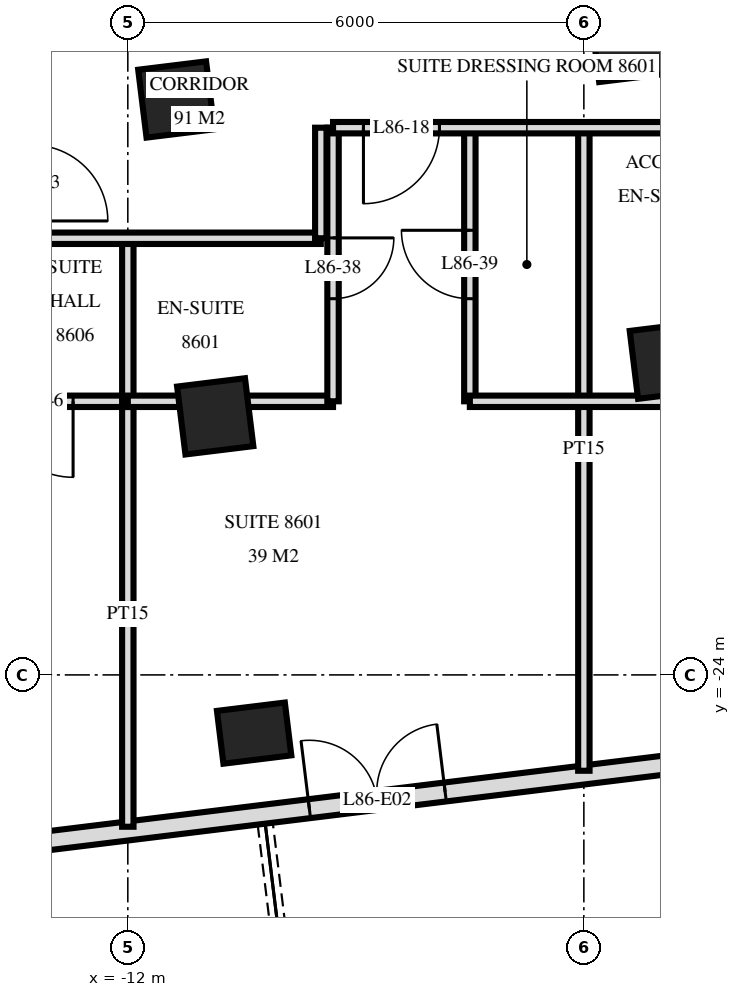
"""IFC4 building model, lengths in metres.
Left out: names, types, materials, properties, quantities, classifications, styles, units other than length and angle.
Written with IfcOpenShell. Run it as: python <this file> out.ifc"""

import sys

from ifc_helpers import new_model, si_unit, direction, frame, frame_2d, origin, origin_2d, place, context, subcontext, project, spatial, rectangle, extrude, element, fill, save


model = new_model("IFC4")
c1 = context("Model", 3, precision=1e-05, world=origin(), true_north=direction((0.0, 1.0)))
c2 = subcontext(c1, "Body", "Model", "MODEL_VIEW")
j1 = project(units=[si_unit("LENGTHUNIT", "METRE"), si_unit("PLANEANGLEUNIT", "RADIAN")], contexts=[c1])
p1 = place(None, origin())
s1 = spatial("IfcSite", under=j1, at=p1, CompositionType="ELEMENT")
p2 = place(p1, origin())
s2 = spatial("IfcBuilding", under=s1, at=p2, CompositionType="ELEMENT")
p3 = place(p2, frame((0.0, 0.0, 326.6)))
s3 = spatial("IfcBuildingStorey", under=s2, at=p3, CompositionType="ELEMENT", Elevation=326.6)
for number, where, z_axis, x_axis in (
    (1, (-11.362, -16.429, 0.0), (0.0, 0.0, 1.0), (0.993, 0.122, 0.0)),
    (2, (-10.85, -20.598, 0.0), (0.0, 0.0, 1.0), (0.993, 0.122, 0.0)),
):
    element("IfcColumn", number, at=place(p3, frame(where, z_axis=z_axis, x_axis=x_axis)), inside=s3, PredefinedType="COLUMN", context=c2, shape_type="SweptSolid", body=[
        extrude(rectangle(XDim=0.9, YDim=0.9, at=origin_2d()), origin(), (0.0, 0.0, 1.0), 4.0),
    ])
p4 = place(p3, frame((-10.338, -24.766, 0.0), z_axis=(0.0, 0.0, 1.0), x_axis=(0.992546151641, 0.121869343405, 0.0)))
e3 = element("IfcColumn", 3, at=p4, inside=s3, PredefinedType="COLUMN", context=c2, shape_type="SweptSolid", body=[
    extrude(rectangle(XDim=0.9, YDim=0.7, at=origin_2d()), origin(), (0.0, 0.0, 1.0), 4.0),
])
for number, where, z_axis, x_axis in (
    (4, (-5.407, -15.698, 0.0), (0.0, 0.0, 1.0), (0.993, 0.122, 0.0)),
    (5, (-4.895, -19.866, 0.0), (0.0, 0.0, 1.0), (0.993, 0.122, 0.0)),
):
    element("IfcColumn", number, at=place(p3, frame(where, z_axis=z_axis, x_axis=x_axis)), inside=s3, PredefinedType="COLUMN", context=c2, shape_type="SweptSolid", body=[
        extrude(rectangle(XDim=0.9, YDim=0.9, at=origin_2d()), origin(), (0.0, 0.0, 1.0), 4.0),
    ])
p5 = place(p3, frame((-16.138, -26.561, 0.0), z_axis=(0.0, 0.0, 1.0), x_axis=(0.992546726876, 0.121864658405, 0.0)))
e6 = element("IfcWall", 6, at=p5, inside=s3, PredefinedType="SOLIDWALL", context=c2, shape_type="SweptSolid", body=[
    extrude(rectangle(XDim=35.951, YDim=0.25, at=frame_2d((17.975, 0.0))), origin(), (0.0, 0.0, 1.0), 3.72),
])
p6 = place(p5, frame((0.575, 0.0, 0.0)))
e7 = element("IfcOpeningElement", 7, at=p6, cuts=e6, PredefinedType="OPENING", context=c2, shape_type="SweptSolid", body=[
    extrude(rectangle(XDim=1.8, YDim=2.4, at=frame_2d((0.9, 1.2))), frame((0.0, 0.135, 0.0), z_axis=(0.0, -1.0, 0.0), x_axis=(1.0, 0.0, 0.0)), (0.0, 0.0, 1.0), 0.27),
])
p7 = place(p5, frame((6.576, 0.0, 0.0)))
e8 = element("IfcOpeningElement", 8, at=p7, cuts=e6, PredefinedType="OPENING", context=c2, shape_type="SweptSolid", body=[
    extrude(rectangle(XDim=1.8, YDim=2.4, at=frame_2d((0.9, 1.2))), frame((0.0, 0.135, 0.0), z_axis=(0.0, -1.0, 0.0), x_axis=(1.0, 0.0, 0.0)), (0.0, 0.0, 1.0), 0.27),
])
p8 = place(p5, frame((12.575, 0.0, 0.0)))
e9 = element("IfcOpeningElement", 9, at=p8, cuts=e6, PredefinedType="OPENING", context=c2, shape_type="SweptSolid", body=[
    extrude(rectangle(XDim=1.8, YDim=2.4, at=frame_2d((0.9, 1.2))), frame((0.0, 0.135, 0.0), z_axis=(0.0, -1.0, 0.0), x_axis=(1.0, 0.0, 0.0)), (0.0, 0.0, 1.0), 0.27),
])
p9 = place(p5, frame((18.575, 0.0, 0.0)))
e10 = element("IfcOpeningElement", 10, at=p9, cuts=e6, PredefinedType="OPENING", context=c2, shape_type="SweptSolid", body=[
    extrude(rectangle(XDim=1.8, YDim=2.4, at=frame_2d((0.9, 1.2))), frame((0.0, 0.135, 0.0), z_axis=(0.0, -1.0, 0.0), x_axis=(1.0, 0.0, 0.0)), (0.0, 0.0, 1.0), 0.27),
])
p10 = place(p5, frame((22.528, 0.0, 0.0)))
e11 = element("IfcOpeningElement", 11, at=p10, cuts=e6, PredefinedType="OPENING", context=c2, shape_type="SweptSolid", body=[
    extrude(rectangle(XDim=1.2, YDim=2.4, at=frame_2d((0.6, 1.2))), frame((0.0, 0.135, 0.0), z_axis=(0.0, -1.0, 0.0), x_axis=(1.0, 0.0, 0.0)), (0.0, 0.0, 1.0), 0.27),
])
p11 = place(p5, frame((25.923, 0.0, 0.0)))
e12 = element("IfcOpeningElement", 12, at=p11, cuts=e6, PredefinedType="OPENING", context=c2, shape_type="SweptSolid", body=[
    extrude(rectangle(XDim=1.8, YDim=2.4, at=frame_2d((0.9, 1.2))), frame((0.0, 0.135, 0.0), z_axis=(0.0, -1.0, 0.0), x_axis=(1.0, 0.0, 0.0)), (0.0, 0.0, 1.0), 0.27),
])
p12 = place(p5, frame((30.576, 0.0, 0.0)))
e13 = element("IfcOpeningElement", 13, at=p12, cuts=e6, PredefinedType="OPENING", context=c2, shape_type="SweptSolid", body=[
    extrude(rectangle(XDim=1.8, YDim=2.4, at=frame_2d((0.9, 1.2))), frame((0.0, 0.135, 0.0), z_axis=(0.0, -1.0, 0.0), x_axis=(1.0, 0.0, 0.0)), (0.0, 0.0, 1.0), 0.27),
])
p13 = place(p3, frame((-6.0, -25.261, 0.0), z_axis=(0.0, 0.0, 1.0), x_axis=(0.0, 1.0, 0.0)))
e14 = element("IfcWall", 14, at=p13, inside=s3, PredefinedType="PARTITIONING", context=c2, shape_type="SweptSolid", body=[
    extrude(rectangle(XDim=8.461, YDim=0.15, at=frame_2d((4.23, 0.0))), origin(), (0.0, 0.0, 1.0), 3.72),
])
p14 = place(p3, frame((-7.5, -20.4, 0.0), z_axis=(0.0, 0.0, 1.0), x_axis=(0.0, 1.0, 0.0)))
e15 = element("IfcWall", 15, at=p14, inside=s3, PredefinedType="PARTITIONING", context=c2, shape_type="SweptSolid", body=[
    extrude(rectangle(XDim=3.6, YDim=0.15, at=frame_2d((1.8, 0.0))), origin(), (0.0, 0.0, 1.0), 3.72),
])
p15 = place(p14, frame((1.35, 0.0, 0.0)))
e16 = element("IfcOpeningElement", 16, at=p15, cuts=e15, PredefinedType="OPENING", context=c2, shape_type="SweptSolid", body=[
    extrude(rectangle(XDim=0.9, YDim=2.1, at=frame_2d((0.45, 1.05))), frame((0.0, 0.085, 0.0), z_axis=(0.0, -1.0, 0.0), x_axis=(1.0, 0.0, 0.0)), (0.0, 0.0, 1.0), 0.17),
])
p16 = place(p3, frame((-9.3, -20.4, 0.0), z_axis=(0.0, 0.0, 1.0), x_axis=(0.0, 1.0, 0.0)))
e17 = element("IfcWall", 17, at=p16, inside=s3, PredefinedType="PARTITIONING", context=c2, shape_type="SweptSolid", body=[
    extrude(rectangle(XDim=3.6, YDim=0.15, at=frame_2d((1.8, 0.0))), origin(), (0.0, 0.0, 1.0), 3.72),
])
p17 = place(p16, frame((1.35, 0.0, 0.0)))
e18 = element("IfcOpeningElement", 18, at=p17, cuts=e17, PredefinedType="OPENING", context=c2, shape_type="SweptSolid", body=[
    extrude(rectangle(XDim=0.8, YDim=2.1, at=frame_2d((0.4, 1.05))), frame((0.0, 0.085, 0.0), z_axis=(0.0, -1.0, 0.0), x_axis=(1.0, 0.0, 0.0)), (0.0, 0.0, 1.0), 0.17),
])
p18 = place(p3, frame((-9.461, -18.255, 0.0), z_axis=(0.0, 0.0, 1.0), x_axis=(0.0, 1.0, 0.0)))
e19 = element("IfcWall", 19, at=p18, inside=s3, PredefinedType="PARTITIONING", context=c2, shape_type="SweptSolid", body=[
    extrude(rectangle(XDim=1.455, YDim=0.15, at=frame_2d((0.728, 0.0))), origin(), (0.0, 0.0, 1.0), 3.72),
])
p19 = place(p3, frame((-12.0, -20.4, 0.0), z_axis=(0.0, 0.0, 1.0), x_axis=(0.0, 1.0, 0.0)))
e20 = element("IfcWall", 20, at=p19, inside=s3, PredefinedType="PARTITIONING", context=c2, shape_type="SweptSolid", body=[
    extrude(rectangle(XDim=2.145, YDim=0.15, at=frame_2d((1.073, 0.0))), origin(), (0.0, 0.0, 1.0), 3.72),
])
p20 = place(p3, frame((-12.0, -25.998, 0.0), z_axis=(0.0, 0.0, 1.0), x_axis=(0.0, 1.0, 0.0)))
e21 = element("IfcWall", 21, at=p20, inside=s3, PredefinedType="PARTITIONING", context=c2, shape_type="SweptSolid", body=[
    extrude(rectangle(XDim=5.598, YDim=0.15, at=frame_2d((2.799, 0.0))), origin(), (0.0, 0.0, 1.0), 3.72),
])
p21 = place(p3, frame((-14.4, -20.4, 0.0), z_axis=(0.0, 0.0, 1.0), x_axis=(1.0, 0.0, 0.0)))
e22 = element("IfcWall", 22, at=p21, inside=s3, PredefinedType="PARTITIONING", context=c2, shape_type="SweptSolid", body=[
    extrude(rectangle(XDim=2.4, YDim=0.15, at=frame_2d((1.2, 0.0))), origin(), (0.0, 0.0, 1.0), 3.72),
])
p22 = place(p21, frame((0.68, 0.0, 0.0)))
e23 = element("IfcOpeningElement", 23, at=p22, cuts=e22, PredefinedType="OPENING", context=c2, shape_type="SweptSolid", body=[
    extrude(rectangle(XDim=1.0, YDim=2.1, at=frame_2d((0.5, 1.05))), frame((0.0, 0.085, 0.0), z_axis=(0.0, -1.0, 0.0), x_axis=(1.0, 0.0, 0.0)), (0.0, 0.0, 1.0), 0.17),
])
p23 = place(p3, frame((-12.0, -20.4, 0.0), z_axis=(0.0, 0.0, 1.0), x_axis=(1.0, 0.0, 0.0)))
e24 = element("IfcWall", 24, at=p23, inside=s3, PredefinedType="PARTITIONING", context=c2, shape_type="SweptSolid", body=[
    extrude(rectangle(XDim=2.7, YDim=0.15, at=frame_2d((1.35, 0.0))), origin(), (0.0, 0.0, 1.0), 3.72),
])
p24 = place(p3, frame((-7.5, -20.4, 0.0), z_axis=(0.0, 0.0, 1.0), x_axis=(1.0, 0.0, 0.0)))
e25 = element("IfcWall", 25, at=p24, inside=s3, PredefinedType="PARTITIONING", context=c2, shape_type="SweptSolid", body=[
    extrude(rectangle(XDim=4.2, YDim=0.15, at=frame_2d((2.1, 0.0))), origin(), (0.0, 0.0, 1.0), 3.72),
])
p25 = place(p3, frame((-13.263, -18.255, 0.0), z_axis=(0.0, 0.0, 1.0), x_axis=(1.0, 0.0, 0.0)))
e26 = element("IfcWall", 26, at=p25, inside=s3, PredefinedType="PARTITIONING", context=c2, shape_type="SweptSolid", body=[
    extrude(rectangle(XDim=3.802, YDim=0.15, at=frame_2d((1.901, 0.0))), origin(), (0.0, 0.0, 1.0), 3.72),
])
p26 = place(p3, frame((-9.3, -16.8, 0.0), z_axis=(0.0, 0.0, 1.0), x_axis=(1.0, 0.0, 0.0)))
e27 = element("IfcWall", 27, at=p26, inside=s3, PredefinedType="PARTITIONING", context=c2, shape_type="SweptSolid", body=[
    extrude(rectangle(XDim=32.561, YDim=0.15, at=frame_2d((16.281, 0.0))), origin(), (0.0, 0.0, 1.0), 3.72),
])
p27 = place(p26, frame((0.4, 0.0, 0.0)))
e28 = element("IfcOpeningElement", 28, at=p27, cuts=e27, PredefinedType="OPENING", context=c2, shape_type="SweptSolid", body=[
    extrude(rectangle(XDim=1.0, YDim=2.1, at=frame_2d((0.5, 1.05))), frame((0.0, 0.085, 0.0), z_axis=(0.0, -1.0, 0.0), x_axis=(1.0, 0.0, 0.0)), (0.0, 0.0, 1.0), 0.17),
])
p28 = place(p26, frame((7.15, 0.0, 0.0)))
e29 = element("IfcOpeningElement", 29, at=p28, cuts=e27, PredefinedType="OPENING", context=c2, shape_type="SweptSolid", body=[
    extrude(rectangle(XDim=1.0, YDim=2.1, at=frame_2d((0.5, 1.05))), frame((0.0, 0.085, 0.0), z_axis=(0.0, -1.0, 0.0), x_axis=(1.0, 0.0, 0.0)), (0.0, 0.0, 1.0), 0.17),
])
p29 = place(p26, frame((9.7, 0.0, 0.0)))
e30 = element("IfcOpeningElement", 30, at=p29, cuts=e27, PredefinedType="OPENING", context=c2, shape_type="SweptSolid", body=[
    extrude(rectangle(XDim=1.0, YDim=2.1, at=frame_2d((0.5, 1.05))), frame((0.0, 0.085, 0.0), z_axis=(0.0, -1.0, 0.0), x_axis=(1.0, 0.0, 0.0)), (0.0, 0.0, 1.0), 0.17),
])
p30 = place(p26, frame((17.149, 0.0, 0.0)))
e31 = element("IfcOpeningElement", 31, at=p30, cuts=e27, PredefinedType="OPENING", context=c2, shape_type="SweptSolid", body=[
    extrude(rectangle(XDim=1.0, YDim=2.1, at=frame_2d((0.5, 1.05))), frame((0.0, 0.085, 0.0), z_axis=(0.0, -1.0, 0.0), x_axis=(1.0, 0.0, 0.0)), (0.0, 0.0, 1.0), 0.17),
])
p31 = place(p26, frame((18.45, 0.0, 0.0)))
e32 = element("IfcOpeningElement", 32, at=p31, cuts=e27, PredefinedType="OPENING", context=c2, shape_type="SweptSolid", body=[
    extrude(rectangle(XDim=1.0, YDim=2.1, at=frame_2d((0.5, 1.05))), frame((0.0, 0.085, 0.0), z_axis=(0.0, -1.0, 0.0), x_axis=(1.0, 0.0, 0.0)), (0.0, 0.0, 1.0), 0.17),
])
p32 = place(p26, frame((24.98, 0.0, 0.0)))
e33 = element("IfcOpeningElement", 33, at=p32, cuts=e27, PredefinedType="OPENING", context=c2, shape_type="SweptSolid", body=[
    extrude(rectangle(XDim=1.0, YDim=2.1, at=frame_2d((0.5, 1.05))), frame((0.0, 0.085, 0.0), z_axis=(0.0, -1.0, 0.0), x_axis=(1.0, 0.0, 0.0)), (0.0, 0.0, 1.0), 0.17),
])
p33 = place(p7, origin())
e34 = element("IfcDoor", 34, at=p33, inside=s3, OperationType="DOUBLE_DOOR_SINGLE_SWING", PredefinedType="DOOR", context=c2, shape_type="SweptSolid", body=[
    extrude(rectangle(XDim=1.8, YDim=2.4, at=frame_2d((0.9, 1.2))), frame((0.0, 0.025, 0.0), z_axis=(0.0, -1.0, 0.0), x_axis=(1.0, 0.0, 0.0)), (0.0, 0.0, 1.0), 0.05),
])
fill(e8, e34)
p34 = place(p27, frame((0.5, 0.0, 0.0), z_axis=(0.0, 0.0, 1.0), x_axis=(-1.0, 0.0, 0.0)))
e35 = element("IfcDoor", 35, at=p34, inside=s3, OperationType="SINGLE_SWING_LEFT", PredefinedType="DOOR", context=c2, shape_type="SweptSolid", body=[
    extrude(rectangle(XDim=1.0, YDim=2.1, at=frame_2d((0.0, 1.05))), frame((0.0, -0.025, 0.0), z_axis=(0.0, 1.0, 0.0), x_axis=(-1.0, 0.0, 0.0)), (0.0, 0.0, 1.0), 0.05),
])
fill(e28, e35)
p35 = place(p17, frame((0.4, 0.0, 0.0), z_axis=(0.0, 0.0, 1.0), x_axis=(-1.0, 0.0, 0.0)))
e36 = element("IfcDoor", 36, at=p35, inside=s3, OperationType="SINGLE_SWING_RIGHT", PredefinedType="DOOR", context=c2, shape_type="SweptSolid", body=[
    extrude(rectangle(XDim=0.8, YDim=2.1, at=frame_2d((0.0, 1.05))), frame((0.0, -0.025, 0.0), z_axis=(0.0, 1.0, 0.0), x_axis=(-1.0, 0.0, 0.0)), (0.0, 0.0, 1.0), 0.05),
])
fill(e18, e36)
p36 = place(p15, origin())
e37 = element("IfcDoor", 37, at=p36, inside=s3, OperationType="SINGLE_SWING_LEFT", PredefinedType="DOOR", context=c2, shape_type="SweptSolid", body=[
    extrude(rectangle(XDim=0.9, YDim=2.1, at=frame_2d((0.45, 1.05))), frame((0.0, 0.025, 0.0), z_axis=(0.0, -1.0, 0.0), x_axis=(1.0, 0.0, 0.0)), (0.0, 0.0, 1.0), 0.05),
])
fill(e16, e37)
p37 = place(p22, frame((0.5, 0.0, 0.0), z_axis=(0.0, 0.0, 1.0), x_axis=(-1.0, 0.0, 0.0)))
e38 = element("IfcDoor", 38, at=p37, inside=s3, OperationType="SINGLE_SWING_RIGHT", PredefinedType="DOOR", context=c2, shape_type="SweptSolid", body=[
    extrude(rectangle(XDim=1.0, YDim=2.1, at=frame_2d((0.0, 1.05))), frame((0.0, -0.025, 0.0), z_axis=(0.0, 1.0, 0.0), x_axis=(-1.0, 0.0, 0.0)), (0.0, 0.0, 1.0), 0.05),
])
fill(e23, e38)
save(model, sys.argv[1])
